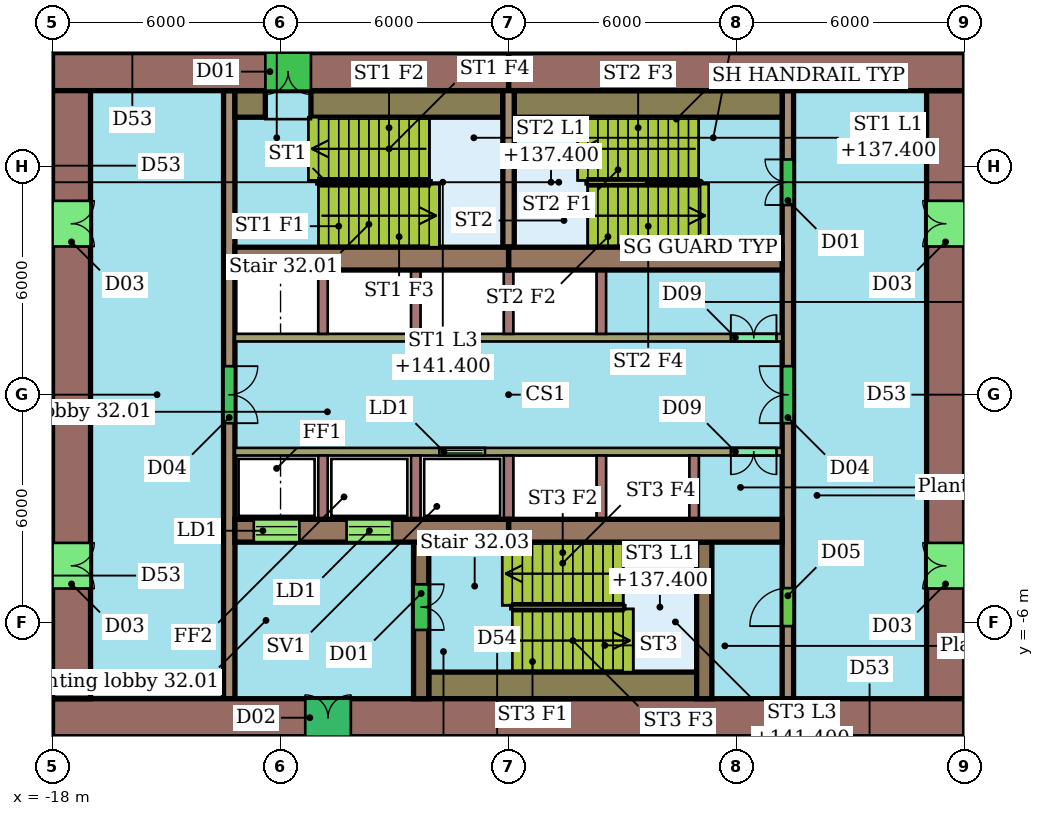
"""IFC4 building model, lengths in metres.
Left out: names, types, materials, properties, quantities, classifications, styles, units other than length and angle.
Written with IfcOpenShell. Run it as: python <this file> out.ifc"""

import sys

from ifc_helpers import new_model, si_unit, direction, frame, frame_2d, origin, place, context, subcontext, project, spatial, rectangle, extrude, element, fill, save


model = new_model("IFC4")
c1 = context("Model", 3, precision=1e-05, world=origin(), true_north=direction((0.0, 1.0)))
c2 = subcontext(c1, "Body", "Model", "MODEL_VIEW")
j1 = project(units=[si_unit("LENGTHUNIT", "METRE"), si_unit("PLANEANGLEUNIT", "RADIAN")], contexts=[c1])
p1 = place(None, origin())
s1 = spatial("IfcSite", under=j1, at=p1, CompositionType="ELEMENT")
p2 = place(p1, origin())
s2 = spatial("IfcBuilding", under=s1, at=p2, CompositionType="ELEMENT")
p3 = place(p2, frame((0.0, 0.0, 135.4)))
s3 = spatial("IfcBuildingStorey", under=s2, at=p3, CompositionType="ELEMENT", Elevation=135.4)
p4 = place(p3, frame((6.0, 8.5, 0.0), z_axis=(0.0, 0.0, 1.0), x_axis=(-1.0, 0.0, 0.0)))
e1 = element("IfcWall", 1, at=p4, inside=s3, PredefinedType="SHEAR", context=c2, shape_type="SweptSolid", body=[
    extrude(rectangle(XDim=12.0, YDim=1.0, at=frame_2d((6.0, 0.0))), origin(), (0.0, 0.0, 1.0), 7.7),
])
p5 = place(p3, frame((-6.0, 8.5, 0.0), z_axis=(0.0, 0.0, 1.0), x_axis=(-1.0, 0.0, 0.0)))
e2 = element("IfcWall", 2, at=p5, inside=s3, PredefinedType="SHEAR", context=c2, shape_type="SweptSolid", body=[
    extrude(rectangle(XDim=12.0, YDim=1.0, at=frame_2d((6.0, 0.0))), origin(), (0.0, 0.0, 1.0), 7.7),
])
p6 = place(p5, frame((5.2, 0.0, 0.0)))
e3 = element("IfcOpeningElement", 3, at=p6, cuts=e2, PredefinedType="OPENING", context=c2, shape_type="SweptSolid", body=[
    extrude(rectangle(XDim=1.2, YDim=2.1, at=frame_2d((0.6, 1.05))), frame((0.0, 0.51, 0.0), z_axis=(0.0, -1.0, 0.0), x_axis=(1.0, 0.0, 0.0)), (0.0, 0.0, 1.0), 1.02),
])
p7 = place(p3, frame((-18.0, -8.5, 0.0), z_axis=(0.0, 0.0, 1.0), x_axis=(1.0, 0.0, 0.0)))
e4 = element("IfcWall", 4, at=p7, inside=s3, PredefinedType="SHEAR", context=c2, shape_type="SweptSolid", body=[
    extrude(rectangle(XDim=24.0, YDim=1.0, at=frame_2d((12.0, 0.0))), origin(), (0.0, 0.0, 1.0), 7.7),
])
p8 = place(p7, frame((6.65, 0.0, 0.0)))
e5 = element("IfcOpeningElement", 5, at=p8, cuts=e4, PredefinedType="OPENING", context=c2, shape_type="SweptSolid", body=[
    extrude(rectangle(XDim=1.2, YDim=2.1, at=frame_2d((0.6, 1.05))), frame((0.0, 0.51, 0.0), z_axis=(0.0, -1.0, 0.0), x_axis=(1.0, 0.0, 0.0)), (0.0, 0.0, 1.0), 1.02),
])
p9 = place(p3, frame((-17.5, 8.0, 0.0), z_axis=(0.0, 0.0, 1.0), x_axis=(0.0, -1.0, 0.0)))
e6 = element("IfcWall", 6, at=p9, inside=s3, PredefinedType="SHEAR", context=c2, shape_type="SweptSolid", body=[
    extrude(rectangle(XDim=16.0, YDim=1.0, at=frame_2d((8.0, 0.0))), origin(), (0.0, 0.0, 1.0), 7.7),
])
p10 = place(p9, frame((11.9, 0.0, 0.0)))
e7 = element("IfcOpeningElement", 7, at=p10, cuts=e6, PredefinedType="OPENING", context=c2, shape_type="SweptSolid", body=[
    extrude(rectangle(XDim=1.2, YDim=2.1, at=frame_2d((0.6, 1.05))), frame((0.0, 0.51, 0.0), z_axis=(0.0, -1.0, 0.0), x_axis=(1.0, 0.0, 0.0)), (0.0, 0.0, 1.0), 1.02),
])
p11 = place(p9, frame((2.9, 0.0, 0.0)))
e8 = element("IfcOpeningElement", 8, at=p11, cuts=e6, PredefinedType="OPENING", context=c2, shape_type="SweptSolid", body=[
    extrude(rectangle(XDim=1.2, YDim=2.1, at=frame_2d((0.6, 1.05))), frame((0.0, 0.51, 0.0), z_axis=(0.0, -1.0, 0.0), x_axis=(1.0, 0.0, 0.0)), (0.0, 0.0, 1.0), 1.02),
])
p12 = place(p3, frame((5.5, -8.0, 0.0), z_axis=(0.0, 0.0, 1.0), x_axis=(0.0, 1.0, 0.0)))
e9 = element("IfcWall", 9, at=p12, inside=s3, PredefinedType="SHEAR", context=c2, shape_type="SweptSolid", body=[
    extrude(rectangle(XDim=16.0, YDim=1.0, at=frame_2d((8.0, 0.0))), origin(), (0.0, 0.0, 1.0), 7.7),
])
p13 = place(p12, frame((2.9, 0.0, 0.0)))
e10 = element("IfcOpeningElement", 10, at=p13, cuts=e9, PredefinedType="OPENING", context=c2, shape_type="SweptSolid", body=[
    extrude(rectangle(XDim=1.2, YDim=2.1, at=frame_2d((0.6, 1.05))), frame((0.0, 0.51, 0.0), z_axis=(0.0, -1.0, 0.0), x_axis=(1.0, 0.0, 0.0)), (0.0, 0.0, 1.0), 1.02),
])
p14 = place(p12, frame((11.9, 0.0, 0.0)))
e11 = element("IfcOpeningElement", 11, at=p14, cuts=e9, PredefinedType="OPENING", context=c2, shape_type="SweptSolid", body=[
    extrude(rectangle(XDim=1.2, YDim=2.1, at=frame_2d((0.6, 1.05))), frame((0.0, 0.51, 0.0), z_axis=(0.0, -1.0, 0.0), x_axis=(1.0, 0.0, 0.0)), (0.0, 0.0, 1.0), 1.02),
])
for number, where, z_axis, x_axis in (
    (12, (-13.2, 3.58, 0.0), (0.0, 0.0, 1.0), (1.0, 0.0, 0.0)),
    (13, (-6.0, 3.58, 0.0), (0.0, 0.0, 1.0), (1.0, 0.0, 0.0)),
):
    element("IfcWall", number, at=place(p3, frame(where, z_axis=z_axis, x_axis=x_axis)), inside=s3, PredefinedType="SHEAR", context=c2, shape_type="SweptSolid", body=[
        extrude(rectangle(XDim=7.2, YDim=0.6, at=frame_2d((3.6, 0.0))), origin(), (0.0, 0.0, 1.0), 7.7),
    ])
p15 = place(p3, frame((-13.2, -3.58, 0.0), z_axis=(0.0, 0.0, 1.0), x_axis=(1.0, 0.0, 0.0)))
e14 = element("IfcWall", 14, at=p15, inside=s3, PredefinedType="SHEAR", context=c2, shape_type="SweptSolid", body=[
    extrude(rectangle(XDim=7.2, YDim=0.6, at=frame_2d((3.6, 0.0))), origin(), (0.0, 0.0, 1.0), 7.7),
])
p16 = place(p15, frame((0.496, 0.0, 0.0)))
e15 = element("IfcOpeningElement", 15, at=p16, cuts=e14, PredefinedType="OPENING", context=c2, shape_type="SweptSolid", body=[
    extrude(rectangle(XDim=1.2, YDim=2.1, at=frame_2d((0.6, 1.05))), frame((0.0, 0.31, 0.0), z_axis=(0.0, -1.0, 0.0), x_axis=(1.0, 0.0, 0.0)), (0.0, 0.0, 1.0), 0.62),
])
p17 = place(p15, frame((2.938, 0.0, 0.0)))
e16 = element("IfcOpeningElement", 16, at=p17, cuts=e14, PredefinedType="OPENING", context=c2, shape_type="SweptSolid", body=[
    extrude(rectangle(XDim=1.2, YDim=2.1, at=frame_2d((0.6, 1.05))), frame((0.0, 0.31, 0.0), z_axis=(0.0, -1.0, 0.0), x_axis=(1.0, 0.0, 0.0)), (0.0, 0.0, 1.0), 0.62),
])
p18 = place(p3, frame((-6.0, -3.58, 0.0), z_axis=(0.0, 0.0, 1.0), x_axis=(1.0, 0.0, 0.0)))
e17 = element("IfcWall", 17, at=p18, inside=s3, PredefinedType="SHEAR", context=c2, shape_type="SweptSolid", body=[
    extrude(rectangle(XDim=7.2, YDim=0.6, at=frame_2d((3.6, 0.0))), origin(), (0.0, 0.0, 1.0), 7.7),
])
p19 = place(p3, frame((-13.35, 8.0, 0.0), z_axis=(0.0, 0.0, 1.0), x_axis=(0.0, -1.0, 0.0)))
e18 = element("IfcWall", 18, at=p19, inside=s3, PredefinedType="SHEAR", context=c2, shape_type="SweptSolid", body=[
    extrude(rectangle(XDim=16.0, YDim=0.3, at=frame_2d((8.0, 0.0))), origin(), (0.0, 0.0, 1.0), 7.7),
])
p20 = place(p19, frame((7.25, 0.0, 0.0)))
e19 = element("IfcOpeningElement", 19, at=p20, cuts=e18, PredefinedType="OPENING", context=c2, shape_type="SweptSolid", body=[
    extrude(rectangle(XDim=1.5, YDim=2.1, at=frame_2d((0.75, 1.05))), frame((0.0, 0.16, 0.0), z_axis=(0.0, -1.0, 0.0), x_axis=(1.0, 0.0, 0.0)), (0.0, 0.0, 1.0), 0.32),
])
p21 = place(p3, frame((1.35, -8.0, 0.0), z_axis=(0.0, 0.0, 1.0), x_axis=(0.0, 1.0, 0.0)))
e20 = element("IfcWall", 20, at=p21, inside=s3, PredefinedType="SHEAR", context=c2, shape_type="SweptSolid", body=[
    extrude(rectangle(XDim=16.0, YDim=0.3, at=frame_2d((8.0, 0.0))), origin(), (0.0, 0.0, 1.0), 7.7),
])
p22 = place(p21, frame((12.99, 0.0, 0.0)))
e21 = element("IfcOpeningElement", 21, at=p22, cuts=e20, PredefinedType="OPENING", context=c2, shape_type="SweptSolid", body=[
    extrude(rectangle(XDim=1.2, YDim=2.1, at=frame_2d((0.6, 1.05))), frame((0.0, 0.16, 0.0), z_axis=(0.0, -1.0, 0.0), x_axis=(1.0, 0.0, 0.0)), (0.0, 0.0, 1.0), 0.32),
])
p23 = place(p21, frame((1.91, 0.0, 0.0)))
e22 = element("IfcOpeningElement", 22, at=p23, cuts=e20, PredefinedType="OPENING", context=c2, shape_type="SweptSolid", body=[
    extrude(rectangle(XDim=1.0, YDim=2.1, at=frame_2d((0.5, 1.05))), frame((0.0, 0.16, 0.0), z_axis=(0.0, -1.0, 0.0), x_axis=(1.0, 0.0, 0.0)), (0.0, 0.0, 1.0), 0.32),
])
p24 = place(p21, frame((7.25, 0.0, 0.0)))
e23 = element("IfcOpeningElement", 23, at=p24, cuts=e20, PredefinedType="OPENING", context=c2, shape_type="SweptSolid", body=[
    extrude(rectangle(XDim=1.5, YDim=2.1, at=frame_2d((0.75, 1.05))), frame((0.0, 0.16, 0.0), z_axis=(0.0, -1.0, 0.0), x_axis=(1.0, 0.0, 0.0)), (0.0, 0.0, 1.0), 0.32),
])
p25 = place(p3, frame((-13.2, 1.5, 0.0), z_axis=(0.0, 0.0, 1.0), x_axis=(1.0, 0.0, 0.0)))
e24 = element("IfcWall", 24, at=p25, inside=s3, PredefinedType="SHEAR", context=c2, shape_type="SweptSolid", body=[
    extrude(rectangle(XDim=14.4, YDim=0.2, at=frame_2d((7.2, 0.0))), origin(), (0.0, 0.0, 1.0), 7.7),
])
p26 = place(p25, frame((13.05, 0.0, 0.0)))
e25 = element("IfcOpeningElement", 25, at=p26, cuts=e24, PredefinedType="OPENING", context=c2, shape_type="SweptSolid", body=[
    extrude(rectangle(XDim=1.2, YDim=2.4, at=frame_2d((0.6, 1.2))), frame((0.0, 0.11, 0.0), z_axis=(0.0, -1.0, 0.0), x_axis=(1.0, 0.0, 0.0)), (0.0, 0.0, 1.0), 0.22),
])
p27 = place(p3, frame((1.2, -1.5, 0.0), z_axis=(0.0, 0.0, 1.0), x_axis=(-1.0, 0.0, 0.0)))
e26 = element("IfcWall", 26, at=p27, inside=s3, PredefinedType="SHEAR", context=c2, shape_type="SweptSolid", body=[
    extrude(rectangle(XDim=14.4, YDim=0.2, at=frame_2d((7.2, 0.0))), origin(), (0.0, 0.0, 1.0), 7.7),
])
p28 = place(p27, frame((7.821, 0.0, 0.0)))
e27 = element("IfcOpeningElement", 27, at=p28, cuts=e26, PredefinedType="OPENING", context=c2, shape_type="SweptSolid", body=[
    extrude(rectangle(XDim=1.2, YDim=2.1, at=frame_2d((0.6, 1.05))), frame((0.0, 0.11, 0.0), z_axis=(0.0, -1.0, 0.0), x_axis=(1.0, 0.0, 0.0)), (0.0, 0.0, 1.0), 0.22),
])
p29 = place(p27, frame((0.15, 0.0, 0.0)))
e28 = element("IfcOpeningElement", 28, at=p29, cuts=e26, PredefinedType="OPENING", context=c2, shape_type="SweptSolid", body=[
    extrude(rectangle(XDim=1.2, YDim=2.4, at=frame_2d((0.6, 1.2))), frame((0.0, 0.11, 0.0), z_axis=(0.0, -1.0, 0.0), x_axis=(1.0, 0.0, 0.0)), (0.0, 0.0, 1.0), 0.22),
])
p30 = place(p3, frame((-8.3, -3.88, 0.0), z_axis=(0.0, 0.0, 1.0), x_axis=(0.0, -1.0, 0.0)))
e29 = element("IfcWall", 29, at=p30, inside=s3, PredefinedType="SHEAR", context=c2, shape_type="SweptSolid", body=[
    extrude(rectangle(XDim=4.12, YDim=0.4, at=frame_2d((2.06, 0.0))), origin(), (0.0, 0.0, 1.0), 7.7),
])
p31 = place(p30, frame((1.11, 0.0, 0.0)))
e30 = element("IfcOpeningElement", 30, at=p31, cuts=e29, PredefinedType="OPENING", context=c2, shape_type="SweptSolid", body=[
    extrude(rectangle(XDim=1.2, YDim=2.1, at=frame_2d((0.6, 1.05))), frame((0.0, 0.21, 0.0), z_axis=(0.0, -1.0, 0.0), x_axis=(1.0, 0.0, 0.0)), (0.0, 0.0, 1.0), 0.42),
])
p32 = place(p3, frame((-0.85, -3.88, 0.0), z_axis=(0.0, 0.0, 1.0), x_axis=(0.0, -1.0, 0.0)))
e31 = element("IfcWall", 31, at=p32, inside=s3, PredefinedType="SHEAR", context=c2, shape_type="SweptSolid", body=[
    extrude(rectangle(XDim=4.12, YDim=0.4, at=frame_2d((2.06, 0.0))), origin(), (0.0, 0.0, 1.0), 7.7),
])
p33 = place(p3, frame((-6.0, 3.88, 0.0), z_axis=(0.0, 0.0, 1.0), x_axis=(0.0, 1.0, 0.0)))
e32 = element("IfcWall", 32, at=p33, inside=s3, PredefinedType="SHEAR", context=c2, shape_type="SweptSolid", body=[
    extrude(rectangle(XDim=4.12, YDim=0.3, at=frame_2d((2.06, 0.0))), origin(), (0.0, 0.0, 1.0), 7.7),
])
p34 = place(p3, frame((-13.2, 7.65, 0.0), z_axis=(0.0, 0.0, 1.0), x_axis=(1.0, 0.0, 0.0)))
e33 = element("IfcWall", 33, at=p34, inside=s3, PredefinedType="SHEAR", context=c2, shape_type="SweptSolid", body=[
    extrude(rectangle(XDim=0.8, YDim=0.7, at=frame_2d((0.4, 0.0))), origin(), (0.0, 0.0, 1.0), 7.7),
])
p35 = place(p3, frame((-11.2, 7.65, 0.0), z_axis=(0.0, 0.0, 1.0), x_axis=(1.0, 0.0, 0.0)))
e34 = element("IfcWall", 34, at=p35, inside=s3, PredefinedType="SHEAR", context=c2, shape_type="SweptSolid", body=[
    extrude(rectangle(XDim=5.05, YDim=0.7, at=frame_2d((2.525, 0.0))), origin(), (0.0, 0.0, 1.0), 7.7),
])
for number, where, z_axis, x_axis in (
    (35, (-5.85, 7.65, 0.0), (0.0, 0.0, 1.0), (1.0, 0.0, 0.0)),
    (36, (-8.1, -7.65, 0.0), (0.0, 0.0, 1.0), (1.0, 0.0, 0.0)),
):
    element("IfcWall", number, at=place(p3, frame(where, z_axis=z_axis, x_axis=x_axis)), inside=s3, PredefinedType="SHEAR", context=c2, shape_type="SweptSolid", body=[
        extrude(rectangle(XDim=7.05, YDim=0.7, at=frame_2d((3.525, 0.0))), origin(), (0.0, 0.0, 1.0), 7.7),
    ])
for number, where, z_axis, x_axis in (
    (37, (-10.883, 1.6, 0.0), (0.0, 0.0, 1.0), (0.0, 1.0, 0.0)),
    (38, (-8.442, 1.6, 0.0), (0.0, 0.0, 1.0), (0.0, 1.0, 0.0)),
    (39, (-6.0, 1.6, 0.0), (0.0, 0.0, 1.0), (0.0, 1.0, 0.0)),
    (40, (-3.558, 1.6, 0.0), (0.0, 0.0, 1.0), (0.0, 1.0, 0.0)),
    (41, (-10.883, -1.6, 0.0), (0.0, 0.0, 1.0), (0.0, -1.0, 0.0)),
    (42, (-8.442, -1.6, 0.0), (0.0, 0.0, 1.0), (0.0, -1.0, 0.0)),
    (43, (-6.0, -1.6, 0.0), (0.0, 0.0, 1.0), (0.0, -1.0, 0.0)),
    (44, (-3.558, -1.6, 0.0), (0.0, 0.0, 1.0), (0.0, -1.0, 0.0)),
    (45, (-1.117, -1.6, 0.0), (0.0, 0.0, 1.0), (0.0, -1.0, 0.0)),
):
    element("IfcWall", number, at=place(p3, frame(where, z_axis=z_axis, x_axis=x_axis)), inside=s3, PredefinedType="SHEAR", context=c2, shape_type="SweptSolid", body=[
        extrude(rectangle(XDim=1.68, YDim=0.25, at=frame_2d((0.84, 0.0))), origin(), (0.0, 0.0, 1.0), 7.7),
    ])
p36 = place(p6, origin())
e46 = element("IfcDoor", 46, at=p36, inside=s3, OperationType="DOUBLE_DOOR_SINGLE_SWING", PredefinedType="NOTDEFINED", context=c2, shape_type="SweptSolid", body=[
    extrude(rectangle(XDim=1.2, YDim=2.1, at=frame_2d((0.6, 1.05))), frame((0.0, 0.025, 0.0), z_axis=(0.0, -1.0, 0.0), x_axis=(1.0, 0.0, 0.0)), (0.0, 0.0, 1.0), 0.05),
])
fill(e3, e46)
p37 = place(p8, origin())
e47 = element("IfcDoor", 47, at=p37, inside=s3, OperationType="DOUBLE_DOOR_SINGLE_SWING", PredefinedType="NOTDEFINED", context=c2, shape_type="SweptSolid", body=[
    extrude(rectangle(XDim=1.2, YDim=2.1, at=frame_2d((0.6, 1.05))), frame((0.0, 0.025, 0.0), z_axis=(0.0, -1.0, 0.0), x_axis=(1.0, 0.0, 0.0)), (0.0, 0.0, 1.0), 0.05),
])
fill(e5, e47)
p38 = place(p10, origin())
e48 = element("IfcDoor", 48, at=p38, inside=s3, OperationType="DOUBLE_DOOR_SINGLE_SWING", PredefinedType="NOTDEFINED", context=c2, shape_type="SweptSolid", body=[
    extrude(rectangle(XDim=1.2, YDim=2.1, at=frame_2d((0.6, 1.05))), frame((0.0, 0.025, 0.0), z_axis=(0.0, -1.0, 0.0), x_axis=(1.0, 0.0, 0.0)), (0.0, 0.0, 1.0), 0.05),
])
fill(e7, e48)
p39 = place(p11, origin())
e49 = element("IfcDoor", 49, at=p39, inside=s3, OperationType="DOUBLE_DOOR_SINGLE_SWING", PredefinedType="NOTDEFINED", context=c2, shape_type="SweptSolid", body=[
    extrude(rectangle(XDim=1.2, YDim=2.1, at=frame_2d((0.6, 1.05))), frame((0.0, 0.025, 0.0), z_axis=(0.0, -1.0, 0.0), x_axis=(1.0, 0.0, 0.0)), (0.0, 0.0, 1.0), 0.05),
])
fill(e8, e49)
p40 = place(p13, origin())
e50 = element("IfcDoor", 50, at=p40, inside=s3, OperationType="DOUBLE_DOOR_SINGLE_SWING", PredefinedType="NOTDEFINED", context=c2, shape_type="SweptSolid", body=[
    extrude(rectangle(XDim=1.2, YDim=2.1, at=frame_2d((0.6, 1.05))), frame((0.0, 0.025, 0.0), z_axis=(0.0, -1.0, 0.0), x_axis=(1.0, 0.0, 0.0)), (0.0, 0.0, 1.0), 0.05),
])
fill(e10, e50)
p41 = place(p14, origin())
e51 = element("IfcDoor", 51, at=p41, inside=s3, OperationType="DOUBLE_DOOR_SINGLE_SWING", PredefinedType="NOTDEFINED", context=c2, shape_type="SweptSolid", body=[
    extrude(rectangle(XDim=1.2, YDim=2.1, at=frame_2d((0.6, 1.05))), frame((0.0, 0.025, 0.0), z_axis=(0.0, -1.0, 0.0), x_axis=(1.0, 0.0, 0.0)), (0.0, 0.0, 1.0), 0.05),
])
fill(e11, e51)
p42 = place(p16, origin())
e52 = element("IfcDoor", 52, at=p42, inside=s3, OperationType="DOUBLE_DOOR_SLIDING", PredefinedType="NOTDEFINED", context=c2, shape_type="SweptSolid", body=[
    extrude(rectangle(XDim=1.2, YDim=2.1, at=frame_2d((0.6, 1.05))), frame((0.0, 0.025, 0.0), z_axis=(0.0, -1.0, 0.0), x_axis=(1.0, 0.0, 0.0)), (0.0, 0.0, 1.0), 0.05),
])
fill(e15, e52)
p43 = place(p17, origin())
e53 = element("IfcDoor", 53, at=p43, inside=s3, OperationType="DOUBLE_DOOR_SLIDING", PredefinedType="NOTDEFINED", context=c2, shape_type="SweptSolid", body=[
    extrude(rectangle(XDim=1.2, YDim=2.1, at=frame_2d((0.6, 1.05))), frame((0.0, 0.025, 0.0), z_axis=(0.0, -1.0, 0.0), x_axis=(1.0, 0.0, 0.0)), (0.0, 0.0, 1.0), 0.05),
])
fill(e16, e53)
p44 = place(p20, origin())
e54 = element("IfcDoor", 54, at=p44, inside=s3, OperationType="DOUBLE_DOOR_SINGLE_SWING", PredefinedType="NOTDEFINED", context=c2, shape_type="SweptSolid", body=[
    extrude(rectangle(XDim=1.5, YDim=2.1, at=frame_2d((0.75, 1.05))), frame((0.0, 0.025, 0.0), z_axis=(0.0, -1.0, 0.0), x_axis=(1.0, 0.0, 0.0)), (0.0, 0.0, 1.0), 0.05),
])
fill(e19, e54)
p45 = place(p22, origin())
e55 = element("IfcDoor", 55, at=p45, inside=s3, OperationType="DOUBLE_DOOR_SINGLE_SWING", PredefinedType="NOTDEFINED", context=c2, shape_type="SweptSolid", body=[
    extrude(rectangle(XDim=1.2, YDim=2.1, at=frame_2d((0.6, 1.05))), frame((0.0, 0.025, 0.0), z_axis=(0.0, -1.0, 0.0), x_axis=(1.0, 0.0, 0.0)), (0.0, 0.0, 1.0), 0.05),
])
fill(e21, e55)
p46 = place(p23, origin())
e56 = element("IfcDoor", 56, at=p46, inside=s3, OperationType="SINGLE_SWING_LEFT", PredefinedType="NOTDEFINED", context=c2, shape_type="SweptSolid", body=[
    extrude(rectangle(XDim=1.0, YDim=2.1, at=frame_2d((0.5, 1.05))), frame((0.0, 0.025, 0.0), z_axis=(0.0, -1.0, 0.0), x_axis=(1.0, 0.0, 0.0)), (0.0, 0.0, 1.0), 0.05),
])
fill(e22, e56)
p47 = place(p24, origin())
e57 = element("IfcDoor", 57, at=p47, inside=s3, OperationType="DOUBLE_DOOR_SINGLE_SWING", PredefinedType="NOTDEFINED", context=c2, shape_type="SweptSolid", body=[
    extrude(rectangle(XDim=1.5, YDim=2.1, at=frame_2d((0.75, 1.05))), frame((0.0, 0.025, 0.0), z_axis=(0.0, -1.0, 0.0), x_axis=(1.0, 0.0, 0.0)), (0.0, 0.0, 1.0), 0.05),
])
fill(e23, e57)
p48 = place(p26, origin())
e58 = element("IfcDoor", 58, at=p48, inside=s3, OperationType="DOUBLE_DOOR_SINGLE_SWING", PredefinedType="NOTDEFINED", context=c2, shape_type="SweptSolid", body=[
    extrude(rectangle(XDim=1.2, YDim=2.4, at=frame_2d((0.6, 1.2))), frame((0.0, 0.025, 0.0), z_axis=(0.0, -1.0, 0.0), x_axis=(1.0, 0.0, 0.0)), (0.0, 0.0, 1.0), 0.05),
])
fill(e25, e58)
p49 = place(p28, origin())
e59 = element("IfcDoor", 59, at=p49, inside=s3, OperationType="DOUBLE_DOOR_SLIDING", PredefinedType="NOTDEFINED", context=c2, shape_type="SweptSolid", body=[
    extrude(rectangle(XDim=1.2, YDim=2.1, at=frame_2d((0.6, 1.05))), frame((0.0, 0.025, 0.0), z_axis=(0.0, -1.0, 0.0), x_axis=(1.0, 0.0, 0.0)), (0.0, 0.0, 1.0), 0.05),
])
fill(e27, e59)
p50 = place(p29, origin())
e60 = element("IfcDoor", 60, at=p50, inside=s3, OperationType="DOUBLE_DOOR_SINGLE_SWING", PredefinedType="NOTDEFINED", context=c2, shape_type="SweptSolid", body=[
    extrude(rectangle(XDim=1.2, YDim=2.4, at=frame_2d((0.6, 1.2))), frame((0.0, 0.025, 0.0), z_axis=(0.0, -1.0, 0.0), x_axis=(1.0, 0.0, 0.0)), (0.0, 0.0, 1.0), 0.05),
])
fill(e28, e60)
p51 = place(p31, origin())
e61 = element("IfcDoor", 61, at=p51, inside=s3, OperationType="DOUBLE_DOOR_SINGLE_SWING", PredefinedType="NOTDEFINED", context=c2, shape_type="SweptSolid", body=[
    extrude(rectangle(XDim=1.2, YDim=2.1, at=frame_2d((0.6, 1.05))), frame((0.0, 0.025, 0.0), z_axis=(0.0, -1.0, 0.0), x_axis=(1.0, 0.0, 0.0)), (0.0, 0.0, 1.0), 0.05),
])
fill(e30, e61)
save(model, sys.argv[1])
